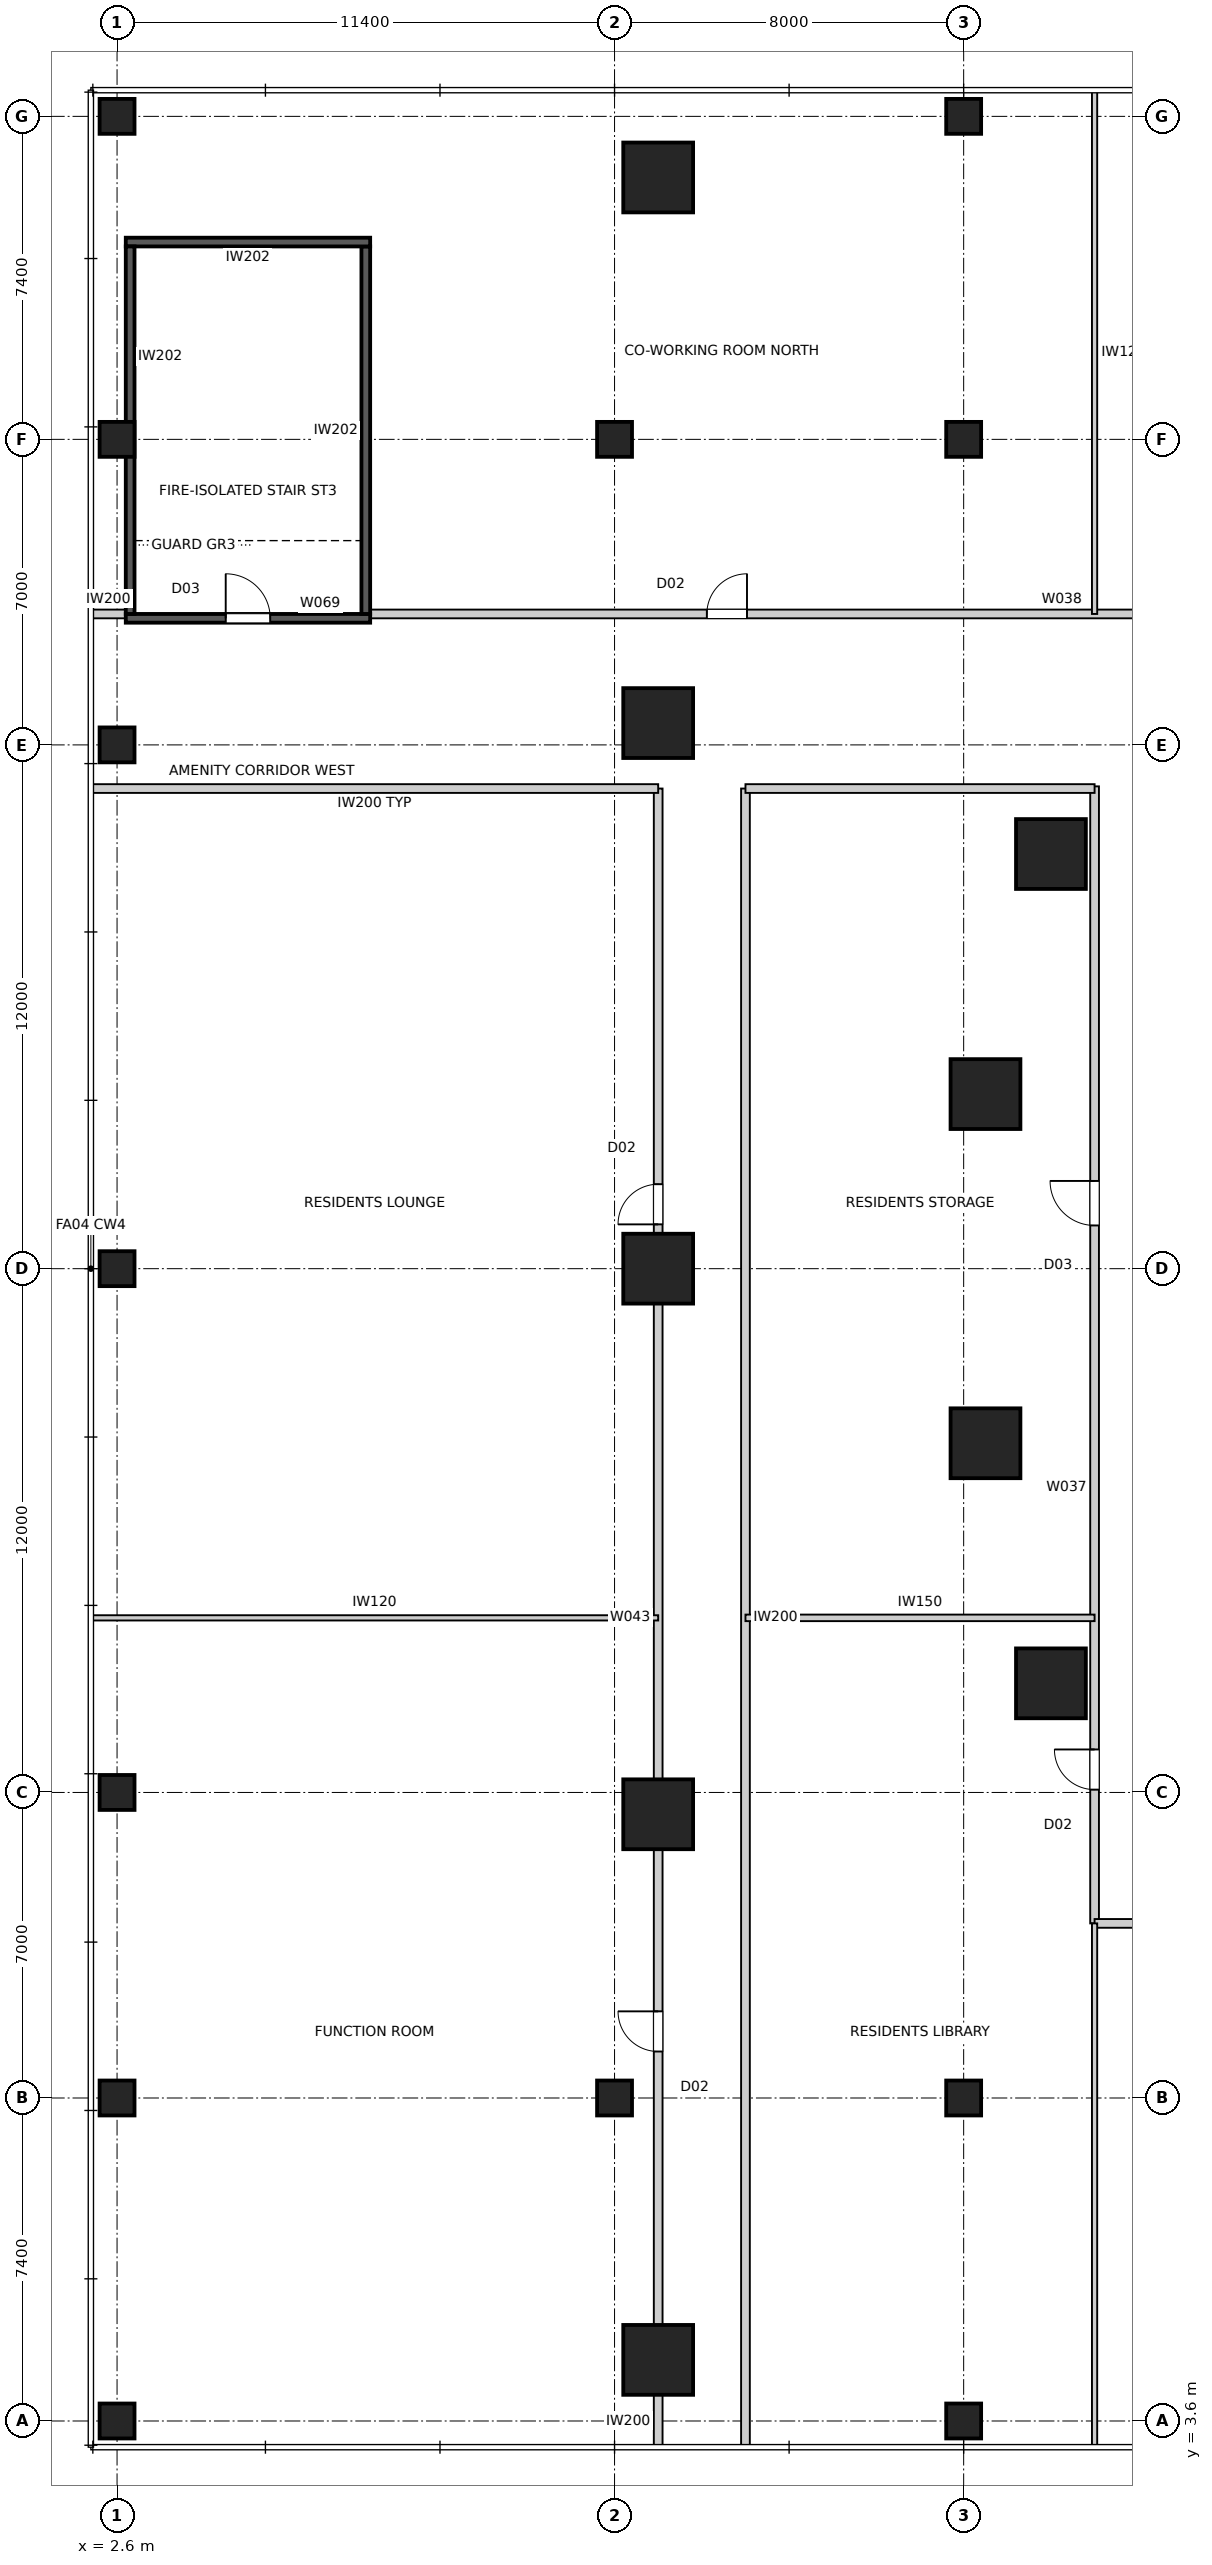
"""IFC4 building model, lengths in metres.
Left out: names, types, materials, properties, quantities, classifications, styles, units other than length and angle.
Written with IfcOpenShell. Run it as: python <this file> out.ifc"""

import sys

from ifc_helpers import new_model, si_unit, direction, frame, frame_2d, origin, origin_2d, place, context, subcontext, project, spatial, rectangle, extrude, element, fill, save


model = new_model("IFC4")
c1 = context("Model", 3, precision=1e-05, world=origin(), true_north=direction((0.0, 1.0)))
c2 = subcontext(c1, "Body", "Model", "MODEL_VIEW")
j1 = project(units=[si_unit("LENGTHUNIT", "METRE"), si_unit("PLANEANGLEUNIT", "RADIAN")], contexts=[c1])
p1 = place(None, origin())
s1 = spatial("IfcSite", under=j1, at=p1, CompositionType="ELEMENT")
p2 = place(p1, origin())
s2 = spatial("IfcBuilding", under=s1, at=p2, CompositionType="ELEMENT")
p3 = place(p2, frame((0.0, 0.0, 10.5)))
s3 = spatial("IfcBuildingStorey", under=s2, at=p3, CompositionType="ELEMENT", Elevation=10.5)
for number, where, z_axis, x_axis in (
    (1, (15.0, 5.0, 0.0), (0.0, 0.0, 1.0), (1.0, 0.0, 0.0)),
    (2, (15.0, 55.0, 0.0), (0.0, 0.0, 1.0), (1.0, 0.0, 0.0)),
    (3, (15.0, 42.5, 0.0), (0.0, 0.0, 1.0), (1.0, 0.0, 0.0)),
    (4, (15.0, 30.0, 0.0), (0.0, 0.0, 1.0), (1.0, 0.0, 0.0)),
    (5, (15.0, 17.5, 0.0), (0.0, 0.0, 1.0), (1.0, 0.0, 0.0)),
):
    element("IfcColumn", number, at=place(p3, frame(where, z_axis=z_axis, x_axis=x_axis)), inside=s3, PredefinedType="COLUMN", context=c2, shape_type="SweptSolid", body=[
        extrude(rectangle(XDim=1.6, YDim=1.6, at=origin_2d()), origin(), (0.0, 0.0, 1.0), 4.5),
    ])
for number, where, z_axis, x_axis in (
    (6, (2.6, 3.6, 0.0), (0.0, 0.0, 1.0), (1.0, 0.0, 0.0)),
    (7, (2.6, 11.0, 0.0), (0.0, 0.0, 1.0), (1.0, 0.0, 0.0)),
    (8, (2.6, 18.0, 0.0), (0.0, 0.0, 1.0), (1.0, 0.0, 0.0)),
    (9, (2.6, 30.0, 0.0), (0.0, 0.0, 1.0), (1.0, 0.0, 0.0)),
    (10, (2.6, 42.0, 0.0), (0.0, 0.0, 1.0), (1.0, 0.0, 0.0)),
    (11, (2.6, 49.0, 0.0), (0.0, 0.0, 1.0), (1.0, 0.0, 0.0)),
    (12, (2.6, 56.4, 0.0), (0.0, 0.0, 1.0), (1.0, 0.0, 0.0)),
    (13, (14.0, 11.0, 0.0), (0.0, 0.0, 1.0), (1.0, 0.0, 0.0)),
    (14, (14.0, 49.0, 0.0), (0.0, 0.0, 1.0), (1.0, 0.0, 0.0)),
    (15, (22.0, 3.6, 0.0), (0.0, 0.0, 1.0), (1.0, 0.0, 0.0)),
    (16, (22.0, 11.0, 0.0), (0.0, 0.0, 1.0), (1.0, 0.0, 0.0)),
    (17, (22.0, 49.0, 0.0), (0.0, 0.0, 1.0), (1.0, 0.0, 0.0)),
    (18, (22.0, 56.4, 0.0), (0.0, 0.0, 1.0), (1.0, 0.0, 0.0)),
):
    element("IfcColumn", number, at=place(p3, frame(where, z_axis=z_axis, x_axis=x_axis)), inside=s3, PredefinedType="COLUMN", context=c2, shape_type="SweptSolid", body=[
        extrude(rectangle(XDim=0.8, YDim=0.8, at=origin_2d()), origin(), (0.0, 0.0, 1.0), 4.5),
    ])
for number, where, z_axis, x_axis in (
    (19, (24.0, 39.5, 0.0), (0.0, 0.0, 1.0), (1.0, 0.0, 0.0)),
    (20, (22.5, 34.0, 0.0), (0.0, 0.0, 1.0), (1.0, 0.0, 0.0)),
    (21, (22.5, 26.0, 0.0), (0.0, 0.0, 1.0), (1.0, 0.0, 0.0)),
    (22, (24.0, 20.5, 0.0), (0.0, 0.0, 1.0), (1.0, 0.0, 0.0)),
):
    element("IfcColumn", number, at=place(p3, frame(where, z_axis=z_axis, x_axis=x_axis)), inside=s3, PredefinedType="COLUMN", context=c2, shape_type="SweptSolid", body=[
        extrude(rectangle(XDim=1.6, YDim=1.6, at=origin_2d()), origin(), (0.0, 0.0, 1.0), 4.5),
    ])
p4 = place(p3, frame((2.8, 44.9, 0.0), z_axis=(0.0, 0.0, 1.0), x_axis=(1.0, 0.0, 0.0)))
e23 = element("IfcWall", 23, at=p4, inside=s3, PredefinedType="SOLIDWALL", context=c2, shape_type="SweptSolid", body=[
    extrude(rectangle(XDim=5.6, YDim=0.2, at=frame_2d((2.8, 0.0))), origin(), (0.0, 0.0, 1.0), 4.35),
])
p5 = place(p4, frame((2.29, 0.0, 0.0)))
e24 = element("IfcOpeningElement", 24, at=p5, cuts=e23, PredefinedType="OPENING", context=c2, shape_type="SweptSolid", body=[
    extrude(rectangle(XDim=1.02, YDim=2.1, at=frame_2d((0.51, 1.05))), frame((0.0, 0.11, 0.0), z_axis=(0.0, -1.0, 0.0), x_axis=(1.0, 0.0, 0.0)), (0.0, 0.0, 1.0), 0.22),
])
p6 = place(p3, frame((8.3, 45.0, 0.0), z_axis=(0.0, 0.0, 1.0), x_axis=(0.0, 1.0, 0.0)))
e25 = element("IfcWall", 25, at=p6, inside=s3, PredefinedType="SOLIDWALL", context=c2, shape_type="SweptSolid", body=[
    extrude(rectangle(XDim=8.42, YDim=0.2, at=frame_2d((4.21, 0.0))), origin(), (0.0, 0.0, 1.0), 4.35),
])
p7 = place(p3, frame((8.4, 53.52, 0.0), z_axis=(0.0, 0.0, 1.0), x_axis=(-1.0, 0.0, 0.0)))
e26 = element("IfcWall", 26, at=p7, inside=s3, PredefinedType="SOLIDWALL", context=c2, shape_type="SweptSolid", body=[
    extrude(rectangle(XDim=5.6, YDim=0.2, at=frame_2d((2.8, 0.0))), origin(), (0.0, 0.0, 1.0), 4.35),
])
p8 = place(p3, frame((2.9, 53.42, 0.0), z_axis=(0.0, 0.0, 1.0), x_axis=(0.0, -1.0, 0.0)))
e27 = element("IfcWall", 27, at=p8, inside=s3, PredefinedType="SOLIDWALL", context=c2, shape_type="SweptSolid", body=[
    extrude(rectangle(XDim=8.42, YDim=0.2, at=frame_2d((4.21, 0.0))), origin(), (0.0, 0.0, 1.0), 4.35),
])
p9 = place(p3, frame((25.0, 15.0, 0.0), z_axis=(0.0, 0.0, 1.0), x_axis=(0.0, 1.0, 0.0)))
e28 = element("IfcWall", 28, at=p9, inside=s3, PredefinedType="PARTITIONING", context=c2, shape_type="SweptSolid", body=[
    extrude(rectangle(XDim=26.05, YDim=0.2, at=frame_2d((13.025, 0.0))), origin(), (0.0, 0.0, 1.0), 4.35),
])
p10 = place(p9, frame((15.99, 0.0, 0.0)))
e29 = element("IfcOpeningElement", 29, at=p10, cuts=e28, PredefinedType="OPENING", context=c2, shape_type="SweptSolid", body=[
    extrude(rectangle(XDim=1.02, YDim=2.1, at=frame_2d((0.51, 1.05))), frame((0.0, 0.11, 0.0), z_axis=(0.0, -1.0, 0.0), x_axis=(1.0, 0.0, 0.0)), (0.0, 0.0, 1.0), 0.22),
])
p11 = place(p9, frame((3.065, 0.0, 0.0)))
e30 = element("IfcOpeningElement", 30, at=p11, cuts=e28, PredefinedType="OPENING", context=c2, shape_type="SweptSolid", body=[
    extrude(rectangle(XDim=0.92, YDim=2.34, at=frame_2d((0.46, 1.17))), frame((0.0, 0.11, 0.0), z_axis=(0.0, -1.0, 0.0), x_axis=(1.0, 0.0, 0.0)), (0.0, 0.0, 1.0), 0.22),
])
p12 = place(p3, frame((8.4, 45.0, 0.0), z_axis=(0.0, 0.0, 1.0), x_axis=(1.0, 0.0, 0.0)))
e31 = element("IfcWall", 31, at=p12, inside=s3, PredefinedType="PARTITIONING", context=c2, shape_type="SweptSolid", body=[
    extrude(rectangle(XDim=28.65, YDim=0.2, at=frame_2d((14.325, 0.0))), origin(), (0.0, 0.0, 1.0), 4.35),
])
p13 = place(p12, frame((23.065, 0.0, 0.0)))
e32 = element("IfcOpeningElement", 32, at=p13, cuts=e31, PredefinedType="OPENING", context=c2, shape_type="SweptSolid", body=[
    extrude(rectangle(XDim=0.92, YDim=2.34, at=frame_2d((0.46, 1.17))), frame((0.0, 0.11, 0.0), z_axis=(0.0, -1.0, 0.0), x_axis=(1.0, 0.0, 0.0)), (0.0, 0.0, 1.0), 0.22),
])
p14 = place(p12, frame((7.715, 0.0, 0.0)))
e33 = element("IfcOpeningElement", 33, at=p14, cuts=e31, PredefinedType="OPENING", context=c2, shape_type="SweptSolid", body=[
    extrude(rectangle(XDim=0.92, YDim=2.34, at=frame_2d((0.46, 1.17))), frame((0.0, 0.11, 0.0), z_axis=(0.0, -1.0, 0.0), x_axis=(1.0, 0.0, 0.0)), (0.0, 0.0, 1.0), 0.22),
])
p15 = place(p3, frame((71.6, 15.0, 0.0), z_axis=(0.0, 0.0, 1.0), x_axis=(-1.0, 0.0, 0.0)))
e34 = element("IfcWall", 34, at=p15, inside=s3, PredefinedType="PARTITIONING", context=c2, shape_type="SweptSolid", body=[
    extrude(rectangle(XDim=46.6, YDim=0.2, at=frame_2d((23.3, 0.0))), origin(), (0.0, 0.0, 1.0), 4.35),
])
p16 = place(p15, frame((31.14, 0.0, 0.0)))
e35 = element("IfcOpeningElement", 35, at=p16, cuts=e34, PredefinedType="OPENING", context=c2, shape_type="SweptSolid", body=[
    extrude(rectangle(XDim=0.92, YDim=2.34, at=frame_2d((0.46, 1.17))), frame((0.0, 0.11, 0.0), z_axis=(0.0, -1.0, 0.0), x_axis=(1.0, 0.0, 0.0)), (0.0, 0.0, 1.0), 0.22),
])
p17 = place(p15, frame((7.665, 0.0, 0.0)))
e36 = element("IfcOpeningElement", 36, at=p17, cuts=e34, PredefinedType="OPENING", context=c2, shape_type="SweptSolid", body=[
    extrude(rectangle(XDim=1.02, YDim=2.1, at=frame_2d((0.51, 1.05))), frame((0.0, 0.11, 0.0), z_axis=(0.0, -1.0, 0.0), x_axis=(1.0, 0.0, 0.0)), (0.0, 0.0, 1.0), 0.22),
])
p18 = place(p3, frame((15.0, 3.0, 0.0), z_axis=(0.0, 0.0, 1.0), x_axis=(0.0, 1.0, 0.0)))
e37 = element("IfcWall", 37, at=p18, inside=s3, PredefinedType="PARTITIONING", context=c2, shape_type="SweptSolid", body=[
    extrude(rectangle(XDim=2.0, YDim=0.2, at=frame_2d((1.0, 0.0))), origin(), (0.0, 0.0, 1.0), 4.35),
])
p19 = place(p3, frame((15.0, 5.0, 0.0), z_axis=(0.0, 0.0, 1.0), x_axis=(0.0, 1.0, 0.0)))
e38 = element("IfcWall", 38, at=p19, inside=s3, PredefinedType="PARTITIONING", context=c2, shape_type="SweptSolid", body=[
    extrude(rectangle(XDim=36.0, YDim=0.2, at=frame_2d((18.0, 0.0))), origin(), (0.0, 0.0, 1.0), 3.534),
])
p20 = place(p19, frame((7.065, 0.0, 0.0)))
e39 = element("IfcOpeningElement", 39, at=p20, cuts=e38, PredefinedType="OPENING", context=c2, shape_type="SweptSolid", body=[
    extrude(rectangle(XDim=0.92, YDim=2.34, at=frame_2d((0.46, 1.17))), frame((0.0, 0.11, 0.0), z_axis=(0.0, -1.0, 0.0), x_axis=(1.0, 0.0, 0.0)), (0.0, 0.0, 1.0), 0.22),
])
p21 = place(p19, frame((26.015, 0.0, 0.0)))
e40 = element("IfcOpeningElement", 40, at=p21, cuts=e38, PredefinedType="OPENING", context=c2, shape_type="SweptSolid", body=[
    extrude(rectangle(XDim=0.92, YDim=2.34, at=frame_2d((0.46, 1.17))), frame((0.0, 0.11, 0.0), z_axis=(0.0, -1.0, 0.0), x_axis=(1.0, 0.0, 0.0)), (0.0, 0.0, 1.0), 0.22),
])
p22 = place(p3, frame((15.0, 41.0, 0.0), z_axis=(0.0, 0.0, 1.0), x_axis=(-1.0, 0.0, 0.0)))
e41 = element("IfcWall", 41, at=p22, inside=s3, PredefinedType="PARTITIONING", context=c2, shape_type="SweptSolid", body=[
    extrude(rectangle(XDim=13.0, YDim=0.2, at=frame_2d((6.5, 0.0))), origin(), (0.0, 0.0, 1.0), 4.35),
])
p23 = place(p3, frame((17.0, 41.0, 0.0), z_axis=(0.0, 0.0, 1.0), x_axis=(0.0, -1.0, 0.0)))
e42 = element("IfcWall", 42, at=p23, inside=s3, PredefinedType="PARTITIONING", context=c2, shape_type="SweptSolid", body=[
    extrude(rectangle(XDim=38.0, YDim=0.2, at=frame_2d((19.0, 0.0))), origin(), (0.0, 0.0, 1.0), 4.35),
])
p24 = place(p3, frame((25.0, 41.0, 0.0), z_axis=(0.0, 0.0, 1.0), x_axis=(-1.0, 0.0, 0.0)))
e43 = element("IfcWall", 43, at=p24, inside=s3, PredefinedType="PARTITIONING", context=c2, shape_type="SweptSolid", body=[
    extrude(rectangle(XDim=8.0, YDim=0.2, at=frame_2d((4.0, 0.0))), origin(), (0.0, 0.0, 1.0), 4.35),
])
p25 = place(p3, frame((2.0, 45.0, 0.0), z_axis=(0.0, 0.0, 1.0), x_axis=(1.0, 0.0, 0.0)))
e44 = element("IfcWall", 44, at=p25, inside=s3, PredefinedType="PARTITIONING", context=c2, shape_type="SweptSolid", body=[
    extrude(rectangle(XDim=0.8, YDim=0.2, at=frame_2d((0.4, 0.0))), origin(), (0.0, 0.0, 1.0), 4.35),
])
p26 = place(p3, frame((2.0, 22.0, 0.0), z_axis=(0.0, 0.0, 1.0), x_axis=(1.0, 0.0, 0.0)))
e45 = element("IfcWall", 45, at=p26, inside=s3, PredefinedType="PARTITIONING", context=c2, shape_type="SweptSolid", body=[
    extrude(rectangle(XDim=13.0, YDim=0.12, at=frame_2d((6.5, 0.0))), origin(), (0.0, 0.0, 1.0), 4.35),
])
p27 = place(p3, frame((17.0, 22.0, 0.0), z_axis=(0.0, 0.0, 1.0), x_axis=(1.0, 0.0, 0.0)))
e46 = element("IfcWall", 46, at=p27, inside=s3, PredefinedType="SOLIDWALL", context=c2, shape_type="SweptSolid", body=[
    extrude(rectangle(XDim=8.0, YDim=0.15, at=frame_2d((4.0, 0.0))), origin(), (0.0, 0.0, 1.0), 4.35),
])
for number, where, z_axis, x_axis in (
    (47, (25.0, 15.0, 0.0), (0.0, 0.0, 1.0), (0.0, -1.0, 0.0)),
    (48, (25.0, 57.0, 0.0), (0.0, 0.0, 1.0), (0.0, -1.0, 0.0)),
):
    element("IfcWall", number, at=place(p3, frame(where, z_axis=z_axis, x_axis=x_axis)), inside=s3, PredefinedType="PARTITIONING", context=c2, shape_type="SweptSolid", body=[
        extrude(rectangle(XDim=12.0, YDim=0.12, at=frame_2d((6.0, 0.0))), origin(), (0.0, 0.0, 1.0), 4.35),
    ])
p28 = place(p10, origin())
e49 = element("IfcDoor", 49, at=p28, inside=s3, OperationType="SINGLE_SWING_RIGHT", PredefinedType="DOOR", context=c2, shape_type="SweptSolid", body=[
    extrude(rectangle(XDim=1.02, YDim=2.1, at=frame_2d((0.51, 1.05))), frame((0.0, 0.025, 0.0), z_axis=(0.0, -1.0, 0.0), x_axis=(1.0, 0.0, 0.0)), (0.0, 0.0, 1.0), 0.05),
])
fill(e29, e49)
p29 = place(p11, origin())
e50 = element("IfcDoor", 50, at=p29, inside=s3, OperationType="SINGLE_SWING_RIGHT", PredefinedType="DOOR", context=c2, shape_type="SweptSolid", body=[
    extrude(rectangle(XDim=0.92, YDim=2.34, at=frame_2d((0.46, 1.17))), frame((0.0, 0.025, 0.0), z_axis=(0.0, -1.0, 0.0), x_axis=(1.0, 0.0, 0.0)), (0.0, 0.0, 1.0), 0.05),
])
fill(e30, e50)
p30 = place(p20, origin())
e51 = element("IfcDoor", 51, at=p30, inside=s3, OperationType="SINGLE_SWING_RIGHT", PredefinedType="DOOR", context=c2, shape_type="SweptSolid", body=[
    extrude(rectangle(XDim=0.92, YDim=2.34, at=frame_2d((0.46, 1.17))), frame((0.0, 0.025, 0.0), z_axis=(0.0, -1.0, 0.0), x_axis=(1.0, 0.0, 0.0)), (0.0, 0.0, 1.0), 0.05),
])
fill(e39, e51)
p31 = place(p21, origin())
e52 = element("IfcDoor", 52, at=p31, inside=s3, OperationType="SINGLE_SWING_LEFT", PredefinedType="DOOR", context=c2, shape_type="SweptSolid", body=[
    extrude(rectangle(XDim=0.92, YDim=2.34, at=frame_2d((0.46, 1.17))), frame((0.0, 0.025, 0.0), z_axis=(0.0, -1.0, 0.0), x_axis=(1.0, 0.0, 0.0)), (0.0, 0.0, 1.0), 0.05),
])
fill(e40, e52)
p32 = place(p14, origin())
e53 = element("IfcDoor", 53, at=p32, inside=s3, OperationType="SINGLE_SWING_RIGHT", PredefinedType="DOOR", context=c2, shape_type="SweptSolid", body=[
    extrude(rectangle(XDim=0.92, YDim=2.34, at=frame_2d((0.46, 1.17))), frame((0.0, 0.025, 0.0), z_axis=(0.0, -1.0, 0.0), x_axis=(1.0, 0.0, 0.0)), (0.0, 0.0, 1.0), 0.05),
])
fill(e33, e53)
p33 = place(p5, origin())
e54 = element("IfcDoor", 54, at=p33, inside=s3, OperationType="SINGLE_SWING_LEFT", PredefinedType="DOOR", context=c2, shape_type="SweptSolid", body=[
    extrude(rectangle(XDim=1.02, YDim=2.1, at=frame_2d((0.51, 1.05))), frame((0.0, 0.025, 0.0), z_axis=(0.0, -1.0, 0.0), x_axis=(1.0, 0.0, 0.0)), (0.0, 0.0, 1.0), 0.05),
])
fill(e24, e54)
save(model, sys.argv[1])
